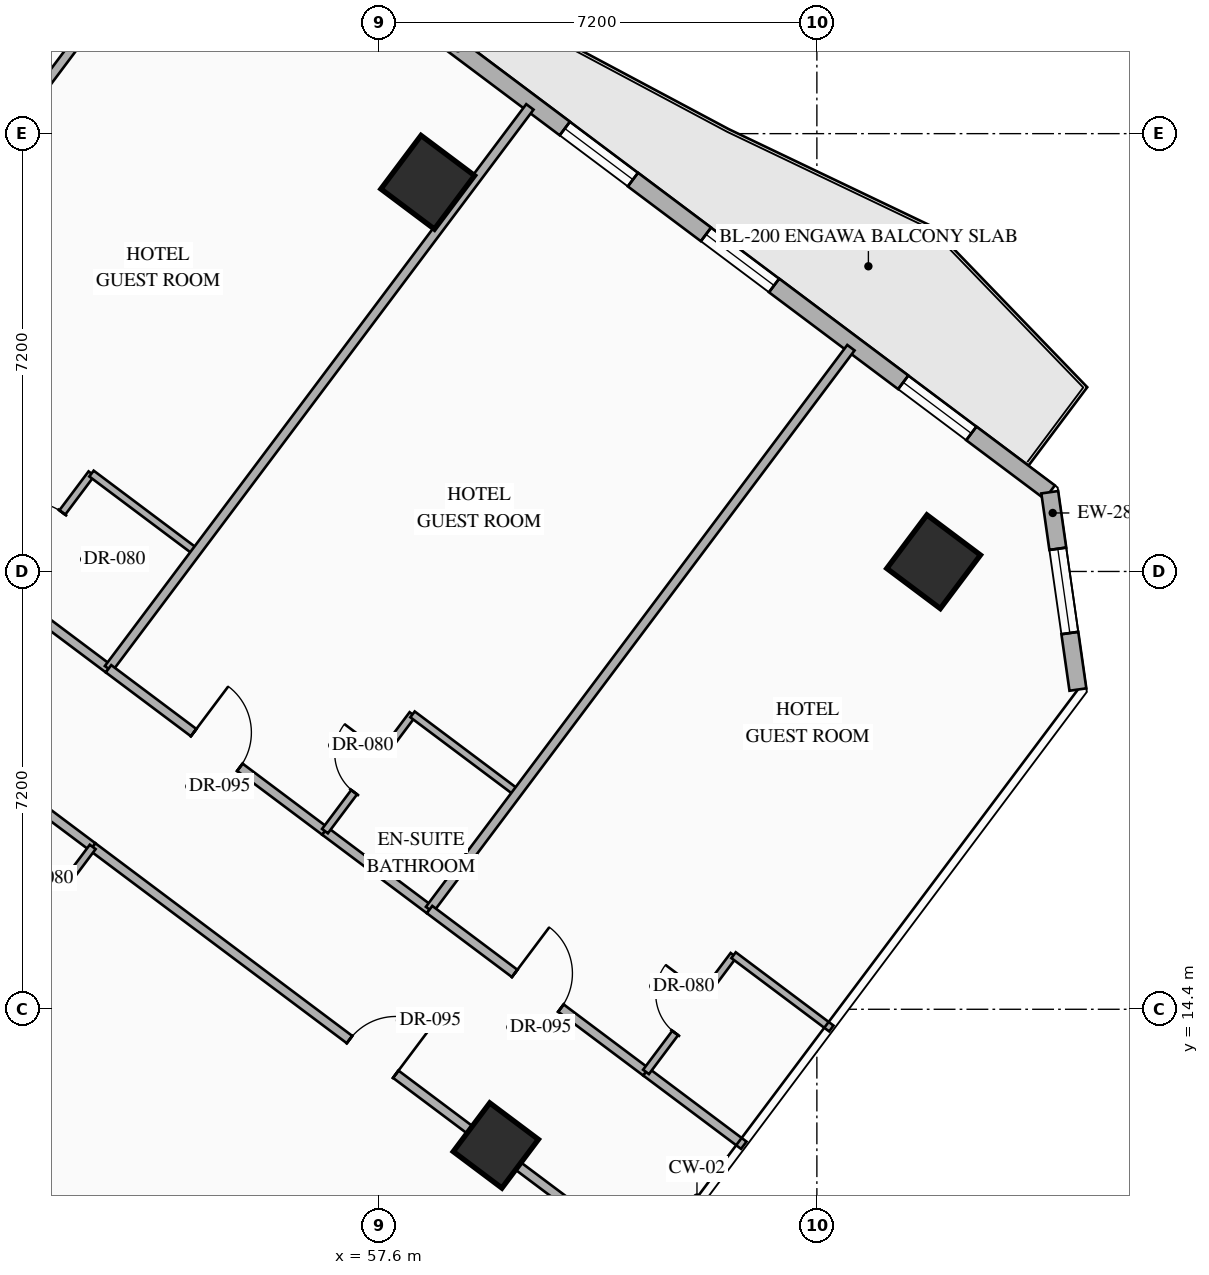
"""IFC4 building model, lengths in metres.
Left out: names, types, materials, properties, quantities, classifications, styles, units other than length and angle.
Written with IfcOpenShell. Run it as: python <this file> out.ifc"""

import sys

from ifc_helpers import new_model, si_unit, direction, frame, frame_2d, origin, origin_2d, place, context, subcontext, project, spatial, rectangle, hollow_rectangle, extrude, element, fill, save


model = new_model("IFC4")
c1 = context("Model", 3, precision=1e-05, world=origin(), true_north=direction((0.0, 1.0)))
c2 = subcontext(c1, "Body", "Model", "MODEL_VIEW")
j1 = project(units=[si_unit("LENGTHUNIT", "METRE"), si_unit("PLANEANGLEUNIT", "RADIAN")], contexts=[c1])
p1 = place(None, origin())
s1 = spatial("IfcSite", under=j1, at=p1, CompositionType="ELEMENT")
p2 = place(p1, origin())
s2 = spatial("IfcBuilding", under=s1, at=p2, CompositionType="ELEMENT")
p3 = place(p2, frame((0.0, 0.0, 66.75)))
s3 = spatial("IfcBuildingStorey", under=s2, at=p3, CompositionType="ELEMENT", Elevation=66.75)
for number, where, z_axis, x_axis in (
    (1, (58.4, 28.0, 0.0), (0.0, 0.0, 1.0), (0.8, -0.6, 0.0)),
    (2, (66.72, 21.76, 0.0), (0.0, 0.0, 1.0), (0.8, -0.6, 0.0)),
):
    element("IfcColumn", number, at=place(p3, frame(where, z_axis=z_axis, x_axis=x_axis)), inside=s3, PredefinedType="COLUMN", context=c2, shape_type="SweptSolid", body=[
        extrude(hollow_rectangle(XDim=1.1, YDim=1.1, WallThickness=0.04, at=origin_2d()), origin(), (0.0, 0.0, 1.0), 3.35),
    ])
p4 = place(p3, frame((59.52, 12.16, 0.0), z_axis=(0.0, 0.0, 1.0), x_axis=(0.799999996291, -0.600000004945, 0.0)))
e3 = element("IfcColumn", 3, at=p4, inside=s3, PredefinedType="COLUMN", context=c2, shape_type="SweptSolid", body=[
    extrude(hollow_rectangle(XDim=1.0, YDim=1.0, WallThickness=0.038, at=origin_2d()), origin(), (0.0, 0.0, 1.0), 3.35),
])
p5 = place(p3, frame((44.86, 40.73, 0.0), z_axis=(0.0, 0.0, 1.0), x_axis=(0.800006902154, -0.599990797017, 0.0)))
e4 = element("IfcWall", 4, at=p5, inside=s3, PredefinedType="STANDARD", context=c2, shape_type="SweptSolid", body=[
    extrude(rectangle(XDim=29.712, YDim=0.28, at=frame_2d((14.856, 0.0))), origin(), (0.0, 0.0, 1.0), 3.09),
])
p6 = place(p5, frame((14.249, 0.0, 0.0)))
e5 = element("IfcOpeningElement", 5, at=p6, cuts=e4, PredefinedType="OPENING", context=c2, shape_type="SweptSolid", body=[
    extrude(rectangle(XDim=1.1, YDim=2.2, at=frame_2d((0.55, 1.1))), frame((0.0, 0.15, 0.0), z_axis=(0.0, -1.0, 0.0), x_axis=(1.0, 0.0, 0.0)), (0.0, 0.0, 1.0), 0.3),
])
p7 = place(p5, frame((1.612, 0.0, 0.85)))
e6 = element("IfcOpeningElement", 6, at=p7, cuts=e4, PredefinedType="OPENING", context=c2, shape_type="SweptSolid", body=[
    extrude(rectangle(XDim=1.4, YDim=1.8, at=frame_2d((0.7, 0.9))), frame((0.0, 0.15, 0.0), z_axis=(0.0, -1.0, 0.0), x_axis=(1.0, 0.0, 0.0)), (0.0, 0.0, 1.0), 0.3),
])
p8 = place(p5, frame((5.667, 0.0, 0.85)))
e7 = element("IfcOpeningElement", 7, at=p8, cuts=e4, PredefinedType="OPENING", context=c2, shape_type="SweptSolid", body=[
    extrude(rectangle(XDim=1.4, YDim=1.8, at=frame_2d((0.7, 0.9))), frame((0.0, 0.15, 0.0), z_axis=(0.0, -1.0, 0.0), x_axis=(1.0, 0.0, 0.0)), (0.0, 0.0, 1.0), 0.3),
])
p9 = place(p5, frame((9.912, 0.0, 0.85)))
e8 = element("IfcOpeningElement", 8, at=p9, cuts=e4, PredefinedType="OPENING", context=c2, shape_type="SweptSolid", body=[
    extrude(rectangle(XDim=1.4, YDim=1.8, at=frame_2d((0.7, 0.9))), frame((0.0, 0.15, 0.0), z_axis=(0.0, -1.0, 0.0), x_axis=(1.0, 0.0, 0.0)), (0.0, 0.0, 1.0), 0.3),
])
p10 = place(p5, frame((19.743, 0.0, 0.85)))
e9 = element("IfcOpeningElement", 9, at=p10, cuts=e4, PredefinedType="OPENING", context=c2, shape_type="SweptSolid", body=[
    extrude(rectangle(XDim=1.4, YDim=1.8, at=frame_2d((0.7, 0.9))), frame((0.0, 0.15, 0.0), z_axis=(0.0, -1.0, 0.0), x_axis=(1.0, 0.0, 0.0)), (0.0, 0.0, 1.0), 0.3),
])
p11 = place(p5, frame((22.645, 0.0, 0.85)))
e10 = element("IfcOpeningElement", 10, at=p11, cuts=e4, PredefinedType="OPENING", context=c2, shape_type="SweptSolid", body=[
    extrude(rectangle(XDim=1.4, YDim=1.8, at=frame_2d((0.7, 0.9))), frame((0.0, 0.15, 0.0), z_axis=(0.0, -1.0, 0.0), x_axis=(1.0, 0.0, 0.0)), (0.0, 0.0, 1.0), 0.3),
])
p12 = place(p5, frame((26.7, 0.0, 0.85)))
e11 = element("IfcOpeningElement", 11, at=p12, cuts=e4, PredefinedType="OPENING", context=c2, shape_type="SweptSolid", body=[
    extrude(rectangle(XDim=1.4, YDim=1.8, at=frame_2d((0.7, 0.9))), frame((0.0, 0.15, 0.0), z_axis=(0.0, -1.0, 0.0), x_axis=(1.0, 0.0, 0.0)), (0.0, 0.0, 1.0), 0.3),
])
p13 = place(p3, frame((68.63, 22.903, 0.0), z_axis=(0.0, 0.0, 1.0), x_axis=(0.141285803956, -0.989968848803, 0.0)))
e12 = element("IfcWall", 12, at=p13, inside=s3, PredefinedType="STANDARD", context=c2, shape_type="SweptSolid", body=[
    extrude(rectangle(XDim=3.278, YDim=0.28, at=frame_2d((1.639, 0.0))), origin(), (0.0, 0.0, 1.0), 3.09),
])
p14 = place(p13, frame((0.939, 0.0, 0.85)))
e13 = element("IfcOpeningElement", 13, at=p14, cuts=e12, PredefinedType="OPENING", context=c2, shape_type="SweptSolid", body=[
    extrude(rectangle(XDim=1.4, YDim=1.8, at=frame_2d((0.7, 0.9))), frame((0.0, 0.15, 0.0), z_axis=(0.0, -1.0, 0.0), x_axis=(1.0, 0.0, 0.0)), (0.0, 0.0, 1.0), 0.3),
])
p15 = place(p3, frame((51.43, 21.29, 0.0), z_axis=(0.0, 0.0, 1.0), x_axis=(0.79998637334, -0.60001816845, 0.0)))
e14 = element("IfcWall", 14, at=p15, inside=s3, PredefinedType="PARTITIONING", context=c2, shape_type="SweptSolid", body=[
    extrude(rectangle(XDim=2.15, YDim=0.15, at=frame_2d((1.075, 0.0))), origin(), (0.0, 0.0, 1.0), 2.775),
])
p16 = place(p3, frame((51.43, 21.29, 0.0), z_axis=(0.0, 0.0, 1.0), x_axis=(0.600065100855, 0.79995117022, 0.0)))
e15 = element("IfcWall", 15, at=p16, inside=s3, PredefinedType="PARTITIONING", context=c2, shape_type="SweptSolid", body=[
    extrude(rectangle(XDim=2.4, YDim=0.12, at=frame_2d((1.2, 0.0))), origin(), (0.0, 0.0, 1.0), 3.09),
])
p17 = place(p16, frame((0.8, 0.0, 0.0)))
e16 = element("IfcOpeningElement", 16, at=p17, cuts=e15, PredefinedType="OPENING", context=c2, shape_type="SweptSolid", body=[
    extrude(rectangle(XDim=0.8, YDim=2.06, at=frame_2d((0.4, 1.03))), frame((0.0, 0.07, 0.0), z_axis=(0.0, -1.0, 0.0), x_axis=(1.0, 0.0, 0.0)), (0.0, 0.0, 1.0), 0.14),
])
p18 = place(p3, frame((52.87, 23.21, 0.0), z_axis=(0.0, 0.0, 1.0), x_axis=(0.79998637334, -0.60001816845, 0.0)))
e17 = element("IfcWall", 17, at=p18, inside=s3, PredefinedType="PARTITIONING", context=c2, shape_type="SweptSolid", body=[
    extrude(rectangle(XDim=2.15, YDim=0.12, at=frame_2d((1.075, 0.0))), origin(), (0.0, 0.0, 1.0), 3.09),
])
for number, where, z_axis, x_axis in (
    (18, (47.87, 23.96, 0.0), (0.0, 0.0, 1.0), (0.6, 0.8, 0.0)),
    (19, (53.15, 20.0, 0.0), (0.0, 0.0, 1.0), (0.6, 0.8, 0.0)),
):
    element("IfcWall", number, at=place(p3, frame(where, z_axis=z_axis, x_axis=x_axis)), inside=s3, PredefinedType="PARTITIONING", context=c2, shape_type="SweptSolid", body=[
        extrude(rectangle(XDim=11.55, YDim=0.15, at=frame_2d((5.775, 0.0))), origin(), (0.0, 0.0, 1.0), 3.09),
    ])
p19 = place(p3, frame((53.15, 20.0, 0.0), z_axis=(0.0, 0.0, 1.0), x_axis=(0.800013166942, -0.599982443676, 0.0)))
e20 = element("IfcWall", 20, at=p19, inside=s3, PredefinedType="PARTITIONING", context=c2, shape_type="SweptSolid", body=[
    extrude(rectangle(XDim=4.45, YDim=0.15, at=frame_2d((2.225, 0.0))), origin(), (0.0, 0.0, 1.0), 2.775),
])
p20 = place(p19, frame((1.75, 0.0, 0.0)))
e21 = element("IfcOpeningElement", 21, at=p20, cuts=e20, PredefinedType="OPENING", context=c2, shape_type="SweptSolid", body=[
    extrude(rectangle(XDim=0.95, YDim=2.15, at=frame_2d((0.475, 1.075))), frame((0.0, 0.085, 0.0), z_axis=(0.0, -1.0, 0.0), x_axis=(1.0, 0.0, 0.0)), (0.0, 0.0, 1.0), 0.17),
])
p21 = place(p3, frame((56.71, 17.33, 0.0), z_axis=(0.0, 0.0, 1.0), x_axis=(0.79998637334, -0.60001816845, 0.0)))
e22 = element("IfcWall", 22, at=p21, inside=s3, PredefinedType="PARTITIONING", context=c2, shape_type="SweptSolid", body=[
    extrude(rectangle(XDim=2.15, YDim=0.15, at=frame_2d((1.075, 0.0))), origin(), (0.0, 0.0, 1.0), 2.775),
])
p22 = place(p3, frame((56.71, 17.33, 0.0), z_axis=(0.0, 0.0, 1.0), x_axis=(0.6, 0.8, 0.0)))
e23 = element("IfcWall", 23, at=p22, inside=s3, PredefinedType="PARTITIONING", context=c2, shape_type="SweptSolid", body=[
    extrude(rectangle(XDim=2.4, YDim=0.12, at=frame_2d((1.2, 0.0))), origin(), (0.0, 0.0, 1.0), 3.09),
])
p23 = place(p22, frame((0.8, 0.0, 0.0)))
e24 = element("IfcOpeningElement", 24, at=p23, cuts=e23, PredefinedType="OPENING", context=c2, shape_type="SweptSolid", body=[
    extrude(rectangle(XDim=0.8, YDim=2.06, at=frame_2d((0.4, 1.03))), frame((0.0, 0.07, 0.0), z_axis=(0.0, -1.0, 0.0), x_axis=(1.0, 0.0, 0.0)), (0.0, 0.0, 1.0), 0.14),
])
p24 = place(p3, frame((58.15, 19.25, 0.0), z_axis=(0.0, 0.0, 1.0), x_axis=(0.800027249606, -0.599963665473, 0.0)))
e25 = element("IfcWall", 25, at=p24, inside=s3, PredefinedType="PARTITIONING", context=c2, shape_type="SweptSolid", body=[
    extrude(rectangle(XDim=2.15, YDim=0.12, at=frame_2d((1.075, 0.0))), origin(), (0.0, 0.0, 1.0), 3.09),
])
p25 = place(p3, frame((58.43, 16.04, 0.0), z_axis=(0.0, 0.0, 1.0), x_axis=(0.60001014597, 0.799992390422, 0.0)))
e26 = element("IfcWall", 26, at=p25, inside=s3, PredefinedType="PARTITIONING", context=c2, shape_type="SweptSolid", body=[
    extrude(rectangle(XDim=11.55, YDim=0.15, at=frame_2d((5.775, 0.0))), origin(), (0.0, 0.0, 1.0), 3.09),
])
p26 = place(p3, frame((58.43, 16.04, 0.0), z_axis=(0.0, 0.0, 1.0), x_axis=(0.800013166942, -0.599982443676, 0.0)))
e27 = element("IfcWall", 27, at=p26, inside=s3, PredefinedType="PARTITIONING", context=c2, shape_type="SweptSolid", body=[
    extrude(rectangle(XDim=4.45, YDim=0.15, at=frame_2d((2.225, 0.0))), origin(), (0.0, 0.0, 1.0), 2.775),
])
p27 = place(p26, frame((1.75, 0.0, 0.0)))
e28 = element("IfcOpeningElement", 28, at=p27, cuts=e27, PredefinedType="OPENING", context=c2, shape_type="SweptSolid", body=[
    extrude(rectangle(XDim=0.95, YDim=2.15, at=frame_2d((0.475, 1.075))), frame((0.0, 0.085, 0.0), z_axis=(0.0, -1.0, 0.0), x_axis=(1.0, 0.0, 0.0)), (0.0, 0.0, 1.0), 0.17),
])
p28 = place(p3, frame((61.99, 13.37, 0.0), z_axis=(0.0, 0.0, 1.0), x_axis=(0.79997084737, -0.600038868206, 0.0)))
e29 = element("IfcWall", 29, at=p28, inside=s3, PredefinedType="PARTITIONING", context=c2, shape_type="SweptSolid", body=[
    extrude(rectangle(XDim=2.01, YDim=0.15, at=frame_2d((1.005, 0.0))), origin(), (0.0, 0.0, 1.0), 3.09),
])
p29 = place(p3, frame((61.99, 13.37, 0.0), z_axis=(0.0, 0.0, 1.0), x_axis=(0.6, 0.8, 0.0)))
e30 = element("IfcWall", 30, at=p29, inside=s3, PredefinedType="PARTITIONING", context=c2, shape_type="SweptSolid", body=[
    extrude(rectangle(XDim=2.4, YDim=0.12, at=frame_2d((1.2, 0.0))), origin(), (0.0, 0.0, 1.0), 3.09),
])
p30 = place(p29, frame((0.8, 0.0, 0.0)))
e31 = element("IfcOpeningElement", 31, at=p30, cuts=e30, PredefinedType="OPENING", context=c2, shape_type="SweptSolid", body=[
    extrude(rectangle(XDim=0.8, YDim=2.06, at=frame_2d((0.4, 1.03))), frame((0.0, 0.07, 0.0), z_axis=(0.0, -1.0, 0.0), x_axis=(1.0, 0.0, 0.0)), (0.0, 0.0, 1.0), 0.14),
])
p31 = place(p3, frame((63.43, 15.29, 0.0), z_axis=(0.0, 0.0, 1.0), x_axis=(0.800014574191, -0.599980567254, 0.0)))
e32 = element("IfcWall", 32, at=p31, inside=s3, PredefinedType="PARTITIONING", context=c2, shape_type="SweptSolid", body=[
    extrude(rectangle(XDim=2.01, YDim=0.12, at=frame_2d((1.005, 0.0))), origin(), (0.0, 0.0, 1.0), 3.09),
])
p32 = place(p3, frame((51.17, 18.36, 0.0), z_axis=(0.0, 0.0, 1.0), x_axis=(0.79998637334, -0.60001816845, 0.0)))
e33 = element("IfcWall", 33, at=p32, inside=s3, PredefinedType="PARTITIONING", context=c2, shape_type="SweptSolid", body=[
    extrude(rectangle(XDim=2.15, YDim=0.15, at=frame_2d((1.075, 0.0))), origin(), (0.0, 0.0, 1.0), 2.425),
])
p33 = place(p3, frame((52.89, 17.07, 0.0), z_axis=(0.0, 0.0, 1.0), x_axis=(0.8, -0.6, 0.0)))
e34 = element("IfcWall", 34, at=p33, inside=s3, PredefinedType="PARTITIONING", context=c2, shape_type="SweptSolid", body=[
    extrude(rectangle(XDim=11.51, YDim=0.15, at=frame_2d((5.755, 0.0))), origin(), (0.0, 0.0, 1.0), 2.425),
])
p34 = place(p33, frame((5.28, 0.0, 0.0)))
e35 = element("IfcOpeningElement", 35, at=p34, cuts=e34, PredefinedType="OPENING", context=c2, shape_type="SweptSolid", body=[
    extrude(rectangle(XDim=0.95, YDim=2.15, at=frame_2d((0.475, 1.075))), frame((0.0, 0.085, 0.0), z_axis=(0.0, -1.0, 0.0), x_axis=(1.0, 0.0, 0.0)), (0.0, 0.0, 1.0), 0.17),
])
p35 = place(p3, frame((51.45, 15.15, 0.0), z_axis=(0.0, 0.0, 1.0), x_axis=(0.599951172744, 0.800036618114, 0.0)))
e36 = element("IfcWall", 36, at=p35, inside=s3, PredefinedType="PARTITIONING", context=c2, shape_type="SweptSolid", body=[
    extrude(rectangle(XDim=2.4, YDim=0.12, at=frame_2d((1.2, 0.0))), origin(), (0.0, 0.0, 1.0), 3.09),
])
p36 = place(p35, frame((0.8, 0.0, 0.0)))
e37 = element("IfcOpeningElement", 37, at=p36, cuts=e36, PredefinedType="OPENING", context=c2, shape_type="SweptSolid", body=[
    extrude(rectangle(XDim=0.8, YDim=2.06, at=frame_2d((0.4, 1.03))), frame((0.0, 0.07, 0.0), z_axis=(0.0, -1.0, 0.0), x_axis=(1.0, 0.0, 0.0)), (0.0, 0.0, 1.0), 0.14),
])
p37 = place(p10, origin())
e38 = element("IfcWindow", 38, at=p37, inside=s3, PartitioningType="SINGLE_PANEL", PredefinedType="WINDOW", context=c2, shape_type="SweptSolid", body=[
    extrude(rectangle(XDim=1.4, YDim=1.8, at=frame_2d((0.7, 0.9))), frame((0.0, 0.03, 0.0), z_axis=(0.0, -1.0, 0.0), x_axis=(1.0, 0.0, 0.0)), (0.0, 0.0, 1.0), 0.06),
])
fill(e9, e38)
p38 = place(p11, origin())
e39 = element("IfcWindow", 39, at=p38, inside=s3, PartitioningType="SINGLE_PANEL", PredefinedType="WINDOW", context=c2, shape_type="SweptSolid", body=[
    extrude(rectangle(XDim=1.4, YDim=1.8, at=frame_2d((0.7, 0.9))), frame((0.0, 0.03, 0.0), z_axis=(0.0, -1.0, 0.0), x_axis=(1.0, 0.0, 0.0)), (0.0, 0.0, 1.0), 0.06),
])
fill(e10, e39)
p39 = place(p12, origin())
e40 = element("IfcWindow", 40, at=p39, inside=s3, PartitioningType="SINGLE_PANEL", PredefinedType="WINDOW", context=c2, shape_type="SweptSolid", body=[
    extrude(rectangle(XDim=1.4, YDim=1.8, at=frame_2d((0.7, 0.9))), frame((0.0, 0.03, 0.0), z_axis=(0.0, -1.0, 0.0), x_axis=(1.0, 0.0, 0.0)), (0.0, 0.0, 1.0), 0.06),
])
fill(e11, e40)
p40 = place(p14, origin())
e41 = element("IfcWindow", 41, at=p40, inside=s3, PartitioningType="SINGLE_PANEL", PredefinedType="WINDOW", context=c2, shape_type="SweptSolid", body=[
    extrude(rectangle(XDim=1.4, YDim=1.8, at=frame_2d((0.7, 0.9))), frame((0.0, 0.03, 0.0), z_axis=(0.0, -1.0, 0.0), x_axis=(1.0, 0.0, 0.0)), (0.0, 0.0, 1.0), 0.06),
])
fill(e13, e41)
p41 = place(p17, origin())
e42 = element("IfcDoor", 42, at=p41, inside=s3, OperationType="SINGLE_SWING_LEFT", PredefinedType="DOOR", context=c2, shape_type="SweptSolid", body=[
    extrude(rectangle(XDim=0.8, YDim=2.06, at=frame_2d((0.4, 1.03))), frame((0.0, 0.025, 0.0), z_axis=(0.0, -1.0, 0.0), x_axis=(1.0, 0.0, 0.0)), (0.0, 0.0, 1.0), 0.05),
])
fill(e16, e42)
p42 = place(p20, origin())
e43 = element("IfcDoor", 43, at=p42, inside=s3, OperationType="SINGLE_SWING_LEFT", PredefinedType="DOOR", context=c2, shape_type="SweptSolid", body=[
    extrude(rectangle(XDim=0.95, YDim=2.15, at=frame_2d((0.475, 1.075))), frame((0.0, 0.025, 0.0), z_axis=(0.0, -1.0, 0.0), x_axis=(1.0, 0.0, 0.0)), (0.0, 0.0, 1.0), 0.05),
])
fill(e21, e43)
p43 = place(p23, origin())
e44 = element("IfcDoor", 44, at=p43, inside=s3, OperationType="SINGLE_SWING_RIGHT", PredefinedType="DOOR", context=c2, shape_type="SweptSolid", body=[
    extrude(rectangle(XDim=0.8, YDim=2.06, at=frame_2d((0.4, 1.03))), frame((0.0, 0.025, 0.0), z_axis=(0.0, -1.0, 0.0), x_axis=(1.0, 0.0, 0.0)), (0.0, 0.0, 1.0), 0.05),
])
fill(e24, e44)
p44 = place(p27, origin())
e45 = element("IfcDoor", 45, at=p44, inside=s3, OperationType="SINGLE_SWING_LEFT", PredefinedType="DOOR", context=c2, shape_type="SweptSolid", body=[
    extrude(rectangle(XDim=0.95, YDim=2.15, at=frame_2d((0.475, 1.075))), frame((0.0, 0.025, 0.0), z_axis=(0.0, -1.0, 0.0), x_axis=(1.0, 0.0, 0.0)), (0.0, 0.0, 1.0), 0.05),
])
fill(e28, e45)
p45 = place(p30, origin())
e46 = element("IfcDoor", 46, at=p45, inside=s3, OperationType="SINGLE_SWING_RIGHT", PredefinedType="DOOR", context=c2, shape_type="SweptSolid", body=[
    extrude(rectangle(XDim=0.8, YDim=2.06, at=frame_2d((0.4, 1.03))), frame((0.0, 0.025, 0.0), z_axis=(0.0, -1.0, 0.0), x_axis=(1.0, 0.0, 0.0)), (0.0, 0.0, 1.0), 0.05),
])
fill(e31, e46)
p46 = place(p34, origin())
e47 = element("IfcDoor", 47, at=p46, inside=s3, OperationType="SINGLE_SWING_RIGHT", PredefinedType="DOOR", context=c2, shape_type="SweptSolid", body=[
    extrude(rectangle(XDim=0.95, YDim=2.15, at=frame_2d((0.475, 1.075))), frame((0.0, 0.025, 0.0), z_axis=(0.0, -1.0, 0.0), x_axis=(1.0, 0.0, 0.0)), (0.0, 0.0, 1.0), 0.05),
])
fill(e35, e47)
p47 = place(p36, origin())
e48 = element("IfcDoor", 48, at=p47, inside=s3, OperationType="SINGLE_SWING_RIGHT", PredefinedType="DOOR", context=c2, shape_type="SweptSolid", body=[
    extrude(rectangle(XDim=0.8, YDim=2.06, at=frame_2d((0.4, 1.03))), frame((0.0, 0.025, 0.0), z_axis=(0.0, -1.0, 0.0), x_axis=(1.0, 0.0, 0.0)), (0.0, 0.0, 1.0), 0.05),
])
fill(e37, e48)
save(model, sys.argv[1])
